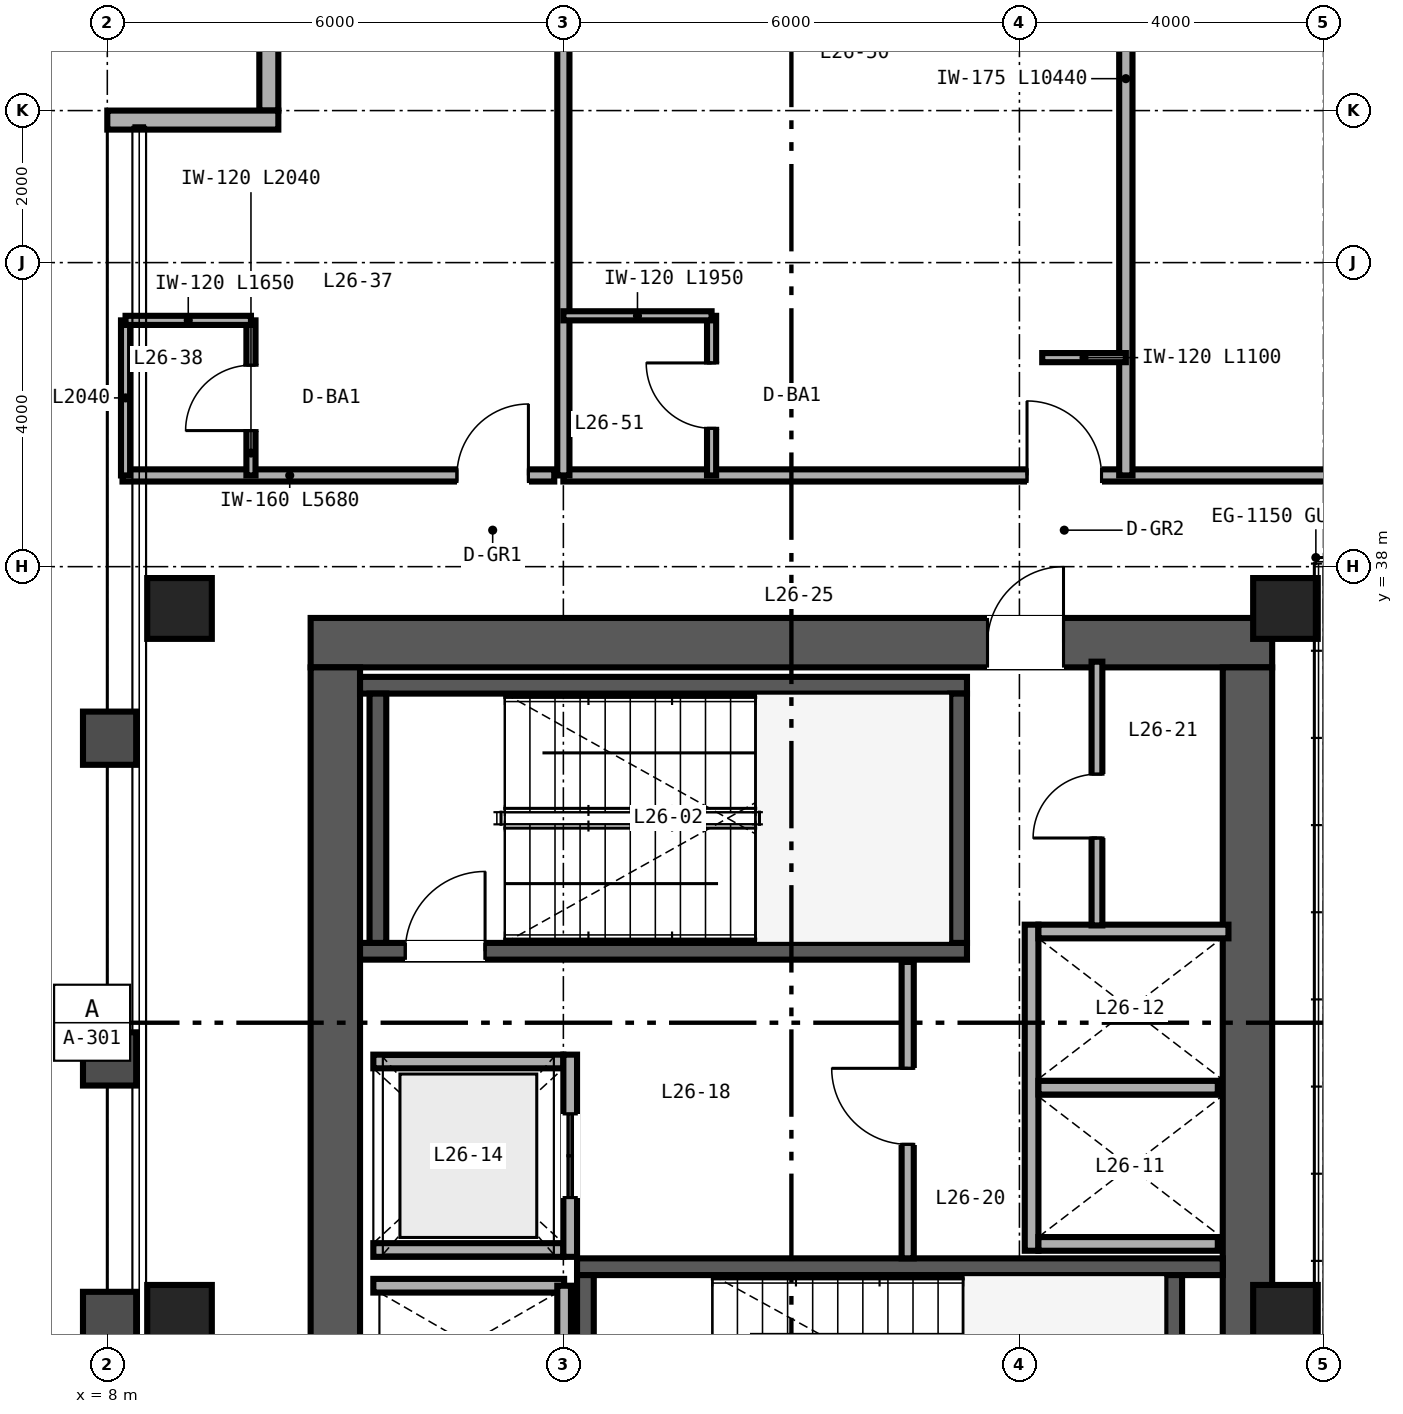
"""IFC4 building model, lengths in metres.
Left out: names, types, materials, properties, quantities, classifications, styles, units other than length and angle.
Written with IfcOpenShell. Run it as: python <this file> out.ifc"""

import sys

from ifc_helpers import new_model, si_unit, direction, frame, frame_2d, origin, origin_2d, place, context, subcontext, project, spatial, rectangle, hollow_rectangle, extrude, source, transform, mapped, element, fill, save


model = new_model("IFC4")
c1 = context("Model", 3, precision=1e-05, world=origin(), true_north=direction((0.0, 1.0)))
c2 = subcontext(c1, "Body", "Model", "MODEL_VIEW")
j1 = project(units=[si_unit("LENGTHUNIT", "METRE"), si_unit("PLANEANGLEUNIT", "RADIAN")], contexts=[c1])
p1 = place(None, origin())
s1 = spatial("IfcSite", under=j1, at=p1, CompositionType="ELEMENT")
p2 = place(p1, origin())
s2 = spatial("IfcBuilding", under=s1, at=p2, CompositionType="ELEMENT")
p3 = place(p2, frame((0.0, 0.0, 108.0)))
s3 = spatial("IfcBuildingStorey", under=s2, at=p3, CompositionType="ELEMENT", Elevation=108.0)
p4 = place(p3, frame((10.675, 37.0, 0.0), z_axis=(0.0, 0.0, 1.0), x_axis=(1.0, 0.0, 0.0)))
e1 = element("IfcWall", 1, at=p4, inside=s3, PredefinedType="SHEAR", context=c2, shape_type="SweptSolid", body=[
    extrude(rectangle(XDim=12.65, YDim=0.65, at=frame_2d((6.325, 0.0))), origin(), (0.0, 0.0, 1.0), 3.36),
])
p5 = place(p4, frame((8.905, 0.0, 0.0)))
e2 = element("IfcOpeningElement", 2, at=p5, cuts=e1, PredefinedType="OPENING", context=c2, shape_type="SweptSolid", body=[
    extrude(rectangle(XDim=1.0, YDim=2.15, at=frame_2d((0.5, 1.075))), frame((0.0, 0.335, 0.0), z_axis=(0.0, -1.0, 0.0), x_axis=(1.0, 0.0, 0.0)), (0.0, 0.0, 1.0), 0.67),
])
for number, where, z_axis, x_axis in (
    (3, (11.0, 15.325, 0.0), (0.0, 0.0, 1.0), (0.0, 1.0, 0.0)),
    (4, (23.0, 15.325, 0.0), (0.0, 0.0, 1.0), (0.0, 1.0, 0.0)),
):
    element("IfcWall", number, at=place(p3, frame(where, z_axis=z_axis, x_axis=x_axis)), inside=s3, PredefinedType="SHEAR", context=c2, shape_type="SweptSolid", body=[
        extrude(rectangle(XDim=21.35, YDim=0.65, at=frame_2d((10.675, 0.0))), origin(), (0.0, 0.0, 1.0), 3.36),
    ])
p6 = place(p3, frame((11.325, 32.94, 0.0), z_axis=(0.0, 0.0, 1.0), x_axis=(1.0, 0.0, 0.0)))
e5 = element("IfcWall", 5, at=p6, inside=s3, PredefinedType="SHEAR", context=c2, shape_type="SweptSolid", body=[
    extrude(rectangle(XDim=7.985, YDim=0.22, at=frame_2d((3.993, 0.0))), origin(), (0.0, 0.0, 1.0), 3.4),
])
p7 = place(p6, frame((0.595, 0.0, 0.0)))
e6 = element("IfcOpeningElement", 6, at=p7, cuts=e5, PredefinedType="OPENING", context=c2, shape_type="SweptSolid", body=[
    extrude(rectangle(XDim=1.05, YDim=2.15, at=frame_2d((0.525, 1.075))), frame((0.0, 0.12, 0.0), z_axis=(0.0, -1.0, 0.0), x_axis=(1.0, 0.0, 0.0)), (0.0, 0.0, 1.0), 0.24),
])
p8 = place(p3, frame((11.325, 36.44, 0.0), z_axis=(0.0, 0.0, 1.0), x_axis=(1.0, 0.0, 0.0)))
e7 = element("IfcWall", 7, at=p8, inside=s3, PredefinedType="SHEAR", context=c2, shape_type="SweptSolid", body=[
    extrude(rectangle(XDim=7.985, YDim=0.22, at=frame_2d((3.993, 0.0))), origin(), (0.0, 0.0, 1.0), 3.4),
])
for number, where, z_axis, x_axis in (
    (8, (11.56, 33.05, 0.0), (0.0, 0.0, 1.0), (0.0, 1.0, 0.0)),
    (9, (19.2, 33.05, 0.0), (0.0, 0.0, 1.0), (0.0, 1.0, 0.0)),
):
    element("IfcWall", number, at=place(p3, frame(where, z_axis=z_axis, x_axis=x_axis)), inside=s3, PredefinedType="SHEAR", context=c2, shape_type="SweptSolid", body=[
        extrude(rectangle(XDim=3.28, YDim=0.22, at=frame_2d((1.64, 0.0))), origin(), (0.0, 0.0, 1.0), 3.4),
    ])
p9 = place(p3, frame((14.18, 28.79, 0.0), z_axis=(0.0, 0.0, 1.0), x_axis=(1.0, 0.0, 0.0)))
e10 = element("IfcWall", 10, at=p9, inside=s3, PredefinedType="SHEAR", context=c2, shape_type="SweptSolid", body=[
    extrude(rectangle(XDim=8.495, YDim=0.22, at=frame_2d((4.248, 0.0))), origin(), (0.0, 0.0, 1.0), 3.4),
])
for number, where, z_axis, x_axis in (
    (11, (14.29, 25.4, 0.0), (0.0, 0.0, 1.0), (0.0, 1.0, 0.0)),
    (12, (22.03, 25.4, 0.0), (0.0, 0.0, 1.0), (0.0, 1.0, 0.0)),
):
    element("IfcWall", number, at=place(p3, frame(where, z_axis=z_axis, x_axis=x_axis)), inside=s3, PredefinedType="SHEAR", context=c2, shape_type="SweptSolid", body=[
        extrude(rectangle(XDim=3.28, YDim=0.22, at=frame_2d((1.64, 0.0))), origin(), (0.0, 0.0, 1.0), 3.4),
    ])
m1 = source(origin(), c2, "Body", "SweptSolid", [
    extrude(hollow_rectangle(XDim=0.85, YDim=0.8, WallThickness=0.032, at=origin_2d()), origin(), (0.0, 0.0, 1.0), 3.36),
])
for number, where, z_axis, x_axis in (
    (13, (8.95, 28.15, 0.0), (0.0, 0.0, 1.0), (1.0, 0.0, 0.0)),
    (14, (23.5, 28.15, 0.0), (0.0, 0.0, 1.0), (1.0, 0.0, 0.0)),
    (15, (8.95, 37.45, 0.0), (0.0, 0.0, 1.0), (1.0, 0.0, 0.0)),
    (16, (23.5, 37.45, 0.0), (0.0, 0.0, 1.0), (1.0, 0.0, 0.0)),
):
    element("IfcColumn", number, at=place(p3, frame(where, z_axis=z_axis, x_axis=x_axis)), inside=s3, PredefinedType="COLUMN", context=c2, shape_type="MappedRepresentation", body=[
        mapped(m1, transform((0.0, 0.0, 0.0), scale=1.0)),
    ])
p10 = place(p3, frame((10.125, 46.0, 0.0), z_axis=(0.0, 0.0, 1.0), x_axis=(0.0, -1.0, 0.0)))
e17 = element("IfcWall", 17, at=p10, inside=s3, PredefinedType="SOLIDWALL", context=c2, shape_type="SweptSolid", body=[
    extrude(rectangle(XDim=2.0, YDim=0.25, at=frame_2d((1.0, 0.0))), origin(), (0.0, 0.0, 1.0), 3.36),
])
p11 = place(p3, frame((10.25, 43.875, 0.0), z_axis=(0.0, 0.0, 1.0), x_axis=(-1.0, 0.0, 0.0)))
e18 = element("IfcWall", 18, at=p11, inside=s3, PredefinedType="SOLIDWALL", context=c2, shape_type="SweptSolid", body=[
    extrude(rectangle(XDim=2.25, YDim=0.25, at=frame_2d((1.125, 0.0))), origin(), (0.0, 0.0, 1.0), 3.36),
])
p12 = place(p3, frame((20.16, 29.0, 0.0), z_axis=(0.0, 0.0, 1.0), x_axis=(0.0, 1.0, 0.0)))
e19 = element("IfcWall", 19, at=p12, inside=s3, PredefinedType="SOLIDWALL", context=c2, shape_type="SweptSolid", body=[
    extrude(rectangle(XDim=4.29, YDim=0.18, at=frame_2d((2.145, 0.0))), origin(), (0.0, 0.0, 1.0), 3.36),
])
p13 = place(p3, frame((20.25, 29.09, 0.0), z_axis=(0.0, 0.0, 1.0), x_axis=(1.0, 0.0, 0.0)))
e20 = element("IfcWall", 20, at=p13, inside=s3, PredefinedType="SOLIDWALL", context=c2, shape_type="SweptSolid", body=[
    extrude(rectangle(XDim=2.36, YDim=0.18, at=frame_2d((1.18, 0.0))), origin(), (0.0, 0.0, 1.0), 3.36),
])
p14 = place(p3, frame((20.25, 33.2, 0.0), z_axis=(0.0, 0.0, 1.0), x_axis=(1.0, 0.0, 0.0)))
e21 = element("IfcWall", 21, at=p14, inside=s3, PredefinedType="SOLIDWALL", context=c2, shape_type="SweptSolid", body=[
    extrude(rectangle(XDim=2.5, YDim=0.18, at=frame_2d((1.25, 0.0))), origin(), (0.0, 0.0, 1.0), 3.36),
])
p15 = place(p3, frame((20.25, 31.145, 0.0), z_axis=(0.0, 0.0, 1.0), x_axis=(1.0, 0.0, 0.0)))
e22 = element("IfcWall", 22, at=p15, inside=s3, PredefinedType="SOLIDWALL", context=c2, shape_type="SweptSolid", body=[
    extrude(rectangle(XDim=2.36, YDim=0.18, at=frame_2d((1.18, 0.0))), origin(), (0.0, 0.0, 1.0), 3.36),
])
for number, where, z_axis, x_axis in (
    (23, (11.5, 29.01, 0.0), (0.0, 0.0, 1.0), (1.0, 0.0, 0.0)),
    (24, (11.5, 31.49, 0.0), (0.0, 0.0, 1.0), (1.0, 0.0, 0.0)),
):
    element("IfcWall", number, at=place(p3, frame(where, z_axis=z_axis, x_axis=x_axis)), inside=s3, PredefinedType="SOLIDWALL", context=c2, shape_type="SweptSolid", body=[
        extrude(rectangle(XDim=2.5, YDim=0.18, at=frame_2d((1.25, 0.0))), origin(), (0.0, 0.0, 1.0), 3.36),
    ])
p16 = place(p3, frame((14.09, 28.92, 0.0), z_axis=(0.0, 0.0, 1.0), x_axis=(0.0, 1.0, 0.0)))
e25 = element("IfcWall", 25, at=p16, inside=s3, PredefinedType="SOLIDWALL", context=c2, shape_type="SweptSolid", body=[
    extrude(rectangle(XDim=2.66, YDim=0.18, at=frame_2d((1.33, 0.0))), origin(), (0.0, 0.0, 1.0), 3.36),
])
p17 = place(p16, frame((0.78, 0.0, 0.0)))
e26 = element("IfcOpeningElement", 26, at=p17, cuts=e25, PredefinedType="OPENING", context=c2, shape_type="SweptSolid", body=[
    extrude(rectangle(XDim=1.1, YDim=2.2, at=frame_2d((0.55, 1.1))), frame((0.0, 0.1, 0.0), z_axis=(0.0, -1.0, 0.0), x_axis=(1.0, 0.0, 0.0)), (0.0, 0.0, 1.0), 0.2),
])
p18 = place(p3, frame((11.5, 28.54, 0.0), z_axis=(0.0, 0.0, 1.0), x_axis=(1.0, 0.0, 0.0)))
e27 = element("IfcWall", 27, at=p18, inside=s3, PredefinedType="SOLIDWALL", context=c2, shape_type="SweptSolid", body=[
    extrude(rectangle(XDim=2.51, YDim=0.18, at=frame_2d((1.255, 0.0))), origin(), (0.0, 0.0, 1.0), 3.36),
])
p19 = place(p3, frame((14.01, 25.46, 0.0), z_axis=(0.0, 0.0, 1.0), x_axis=(0.0, 1.0, 0.0)))
e28 = element("IfcWall", 28, at=p19, inside=s3, PredefinedType="SOLIDWALL", context=c2, shape_type="SweptSolid", body=[
    extrude(rectangle(XDim=3.08, YDim=0.18, at=frame_2d((1.54, 0.0))), origin(), (0.0, 0.0, 1.0), 3.36),
])
p20 = place(p3, frame((18.53, 28.9, 0.0), z_axis=(0.0, 0.0, 1.0), x_axis=(0.0, 1.0, 0.0)))
e29 = element("IfcWall", 29, at=p20, inside=s3, PredefinedType="PARTITIONING", context=c2, shape_type="SweptSolid", body=[
    extrude(rectangle(XDim=3.9, YDim=0.16, at=frame_2d((1.95, 0.0))), origin(), (0.0, 0.0, 1.0), 3.36),
])
p21 = place(p20, frame((1.5, 0.0, 0.0)))
e30 = element("IfcOpeningElement", 30, at=p21, cuts=e29, PredefinedType="OPENING", context=c2, shape_type="SweptSolid", body=[
    extrude(rectangle(XDim=1.0, YDim=2.15, at=frame_2d((0.5, 1.075))), frame((0.0, 0.09, 0.0), z_axis=(0.0, -1.0, 0.0), x_axis=(1.0, 0.0, 0.0)), (0.0, 0.0, 1.0), 0.18),
])
p22 = place(p3, frame((21.02, 33.28, 0.0), z_axis=(0.0, 0.0, 1.0), x_axis=(0.0, 1.0, 0.0)))
e31 = element("IfcWall", 31, at=p22, inside=s3, PredefinedType="PARTITIONING", context=c2, shape_type="SweptSolid", body=[
    extrude(rectangle(XDim=3.47, YDim=0.142, at=frame_2d((1.735, 0.0))), origin(), (0.0, 0.0, 1.0), 3.36),
])
p23 = place(p22, frame((1.15, 0.0, 0.0)))
e32 = element("IfcOpeningElement", 32, at=p23, cuts=e31, PredefinedType="OPENING", context=c2, shape_type="SweptSolid", body=[
    extrude(rectangle(XDim=0.84, YDim=2.1, at=frame_2d((0.42, 1.05))), frame((0.0, 0.081, 0.0), z_axis=(0.0, -1.0, 0.0), x_axis=(1.0, 0.0, 0.0)), (0.0, 0.0, 1.0), 0.162),
])
p24 = place(p3, frame((8.2, 39.2, 0.0), z_axis=(0.0, 0.0, 1.0), x_axis=(1.0, 0.0, 0.0)))
e33 = element("IfcWall", 33, at=p24, inside=s3, PredefinedType="PARTITIONING", context=c2, shape_type="SweptSolid", body=[
    extrude(rectangle(XDim=5.68, YDim=0.16, at=frame_2d((2.84, 0.0))), origin(), (0.0, 0.0, 1.0), 3.36),
])
p25 = place(p24, frame((4.4, 0.0, 0.0)))
e34 = element("IfcOpeningElement", 34, at=p25, cuts=e33, PredefinedType="OPENING", context=c2, shape_type="SweptSolid", body=[
    extrude(rectangle(XDim=0.94, YDim=2.15, at=frame_2d((0.47, 1.075))), frame((0.0, 0.09, 0.0), z_axis=(0.0, -1.0, 0.0), x_axis=(1.0, 0.0, 0.0)), (0.0, 0.0, 1.0), 0.18),
])
p26 = place(p3, frame((9.89, 39.2, 0.0), z_axis=(0.0, 0.0, 1.0), x_axis=(0.0, 1.0, 0.0)))
e35 = element("IfcWall", 35, at=p26, inside=s3, PredefinedType="PARTITIONING", context=c2, shape_type="SweptSolid", body=[
    extrude(rectangle(XDim=2.04, YDim=0.12, at=frame_2d((1.02, 0.0))), origin(), (0.0, 0.0, 1.0), 3.36),
])
p27 = place(p26, frame((0.59, 0.0, 0.0)))
e36 = element("IfcOpeningElement", 36, at=p27, cuts=e35, PredefinedType="OPENING", context=c2, shape_type="SweptSolid", body=[
    extrude(rectangle(XDim=0.86, YDim=2.1, at=frame_2d((0.43, 1.05))), frame((0.0, 0.07, 0.0), z_axis=(0.0, -1.0, 0.0), x_axis=(1.0, 0.0, 0.0)), (0.0, 0.0, 1.0), 0.14),
])
p28 = place(p3, frame((8.24, 39.2, 0.0), z_axis=(0.0, 0.0, 1.0), x_axis=(0.0, 1.0, 0.0)))
e37 = element("IfcWall", 37, at=p28, inside=s3, PredefinedType="PARTITIONING", context=c2, shape_type="SweptSolid", body=[
    extrude(rectangle(XDim=2.04, YDim=0.12, at=frame_2d((1.02, 0.0))), origin(), (0.0, 0.0, 1.0), 3.36),
])
p29 = place(p3, frame((8.24, 41.24, 0.0), z_axis=(0.0, 0.0, 1.0), x_axis=(1.0, 0.0, 0.0)))
e38 = element("IfcWall", 38, at=p29, inside=s3, PredefinedType="PARTITIONING", context=c2, shape_type="SweptSolid", body=[
    extrude(rectangle(XDim=1.65, YDim=0.12, at=frame_2d((0.825, 0.0))), origin(), (0.0, 0.0, 1.0), 3.36),
])
p30 = place(p3, frame((14.0, 39.2, 0.0), z_axis=(0.0, 0.0, 1.0), x_axis=(1.0, 0.0, 0.0)))
e39 = element("IfcWall", 39, at=p30, inside=s3, PredefinedType="PARTITIONING", context=c2, shape_type="SweptSolid", body=[
    extrude(rectangle(XDim=36.0, YDim=0.16, at=frame_2d((18.0, 0.0))), origin(), (0.0, 0.0, 1.0), 2.581),
])
p31 = place(p30, frame((6.1, 0.0, 0.0)))
e40 = element("IfcOpeningElement", 40, at=p31, cuts=e39, PredefinedType="OPENING", context=c2, shape_type="SweptSolid", body=[
    extrude(rectangle(XDim=0.98, YDim=2.2, at=frame_2d((0.49, 1.1))), frame((0.0, 0.09, 0.0), z_axis=(0.0, -1.0, 0.0), x_axis=(1.0, 0.0, 0.0)), (0.0, 0.0, 1.0), 0.18),
])
p32 = place(p30, frame((10.62, 0.0, 0.0)))
e41 = element("IfcOpeningElement", 41, at=p32, cuts=e39, PredefinedType="OPENING", context=c2, shape_type="SweptSolid", body=[
    extrude(rectangle(XDim=0.96, YDim=2.15, at=frame_2d((0.48, 1.075))), frame((0.0, 0.09, 0.0), z_axis=(0.0, -1.0, 0.0), x_axis=(1.0, 0.0, 0.0)), (0.0, 0.0, 1.0), 0.18),
])
p33 = place(p30, frame((21.1, 0.0, 0.0)))
e42 = element("IfcOpeningElement", 42, at=p33, cuts=e39, PredefinedType="OPENING", context=c2, shape_type="SweptSolid", body=[
    extrude(rectangle(XDim=0.98, YDim=2.2, at=frame_2d((0.49, 1.1))), frame((0.0, 0.09, 0.0), z_axis=(0.0, -1.0, 0.0), x_axis=(1.0, 0.0, 0.0)), (0.0, 0.0, 1.0), 0.18),
])
p34 = place(p30, frame((24.84, 0.0, 0.0)))
e43 = element("IfcOpeningElement", 43, at=p34, cuts=e39, PredefinedType="OPENING", context=c2, shape_type="SweptSolid", body=[
    extrude(rectangle(XDim=0.96, YDim=2.15, at=frame_2d((0.48, 1.075))), frame((0.0, 0.09, 0.0), z_axis=(0.0, -1.0, 0.0), x_axis=(1.0, 0.0, 0.0)), (0.0, 0.0, 1.0), 0.18),
])
p35 = place(p30, frame((34.74, 0.0, 0.0)))
e44 = element("IfcOpeningElement", 44, at=p35, cuts=e39, PredefinedType="OPENING", context=c2, shape_type="SweptSolid", body=[
    extrude(rectangle(XDim=0.94, YDim=2.15, at=frame_2d((0.47, 1.075))), frame((0.0, 0.09, 0.0), z_axis=(0.0, -1.0, 0.0), x_axis=(1.0, 0.0, 0.0)), (0.0, 0.0, 1.0), 0.18),
])
p36 = place(p3, frame((14.0, 39.2, 0.0), z_axis=(0.0, 0.0, 1.0), x_axis=(0.0, 1.0, 0.0)))
e45 = element("IfcWall", 45, at=p36, inside=s3, PredefinedType="PARTITIONING", context=c2, shape_type="SweptSolid", body=[
    extrude(rectangle(XDim=10.44, YDim=0.16, at=frame_2d((5.22, 0.0))), origin(), (0.0, 0.0, 1.0), 2.667),
])
p37 = place(p3, frame((21.4, 39.2, 0.0), z_axis=(0.0, 0.0, 1.0), x_axis=(0.0, 1.0, 0.0)))
e46 = element("IfcWall", 46, at=p37, inside=s3, PredefinedType="PARTITIONING", context=c2, shape_type="SweptSolid", body=[
    extrude(rectangle(XDim=10.44, YDim=0.175, at=frame_2d((5.22, 0.0))), origin(), (0.0, 0.0, 1.0), 2.823),
])
p38 = place(p3, frame((15.95, 39.2, 0.0), z_axis=(0.0, 0.0, 1.0), x_axis=(0.0, 1.0, 0.0)))
e47 = element("IfcWall", 47, at=p38, inside=s3, PredefinedType="PARTITIONING", context=c2, shape_type="SweptSolid", body=[
    extrude(rectangle(XDim=2.1, YDim=0.12, at=frame_2d((1.05, 0.0))), origin(), (0.0, 0.0, 1.0), 3.36),
])
p39 = place(p38, frame((0.62, 0.0, 0.0)))
e48 = element("IfcOpeningElement", 48, at=p39, cuts=e47, PredefinedType="OPENING", context=c2, shape_type="SweptSolid", body=[
    extrude(rectangle(XDim=0.86, YDim=2.1, at=frame_2d((0.43, 1.05))), frame((0.0, 0.07, 0.0), z_axis=(0.0, -1.0, 0.0), x_axis=(1.0, 0.0, 0.0)), (0.0, 0.0, 1.0), 0.14),
])
p40 = place(p3, frame((14.0, 41.3, 0.0), z_axis=(0.0, 0.0, 1.0), x_axis=(1.0, 0.0, 0.0)))
e49 = element("IfcWall", 49, at=p40, inside=s3, PredefinedType="PARTITIONING", context=c2, shape_type="SweptSolid", body=[
    extrude(rectangle(XDim=1.95, YDim=0.12, at=frame_2d((0.975, 0.0))), origin(), (0.0, 0.0, 1.0), 3.36),
])
p41 = place(p3, frame((20.3, 40.75, 0.0), z_axis=(0.0, 0.0, 1.0), x_axis=(1.0, 0.0, 0.0)))
e50 = element("IfcWall", 50, at=p41, inside=s3, PredefinedType="PARTITIONING", context=c2, shape_type="SweptSolid", body=[
    extrude(rectangle(XDim=1.1, YDim=0.12, at=frame_2d((0.55, 0.0))), origin(), (0.0, 0.0, 1.0), 3.36),
])
m2 = source(origin(), c2, "Body", "SweptSolid", [
    extrude(rectangle(XDim=1.05, YDim=2.15, at=frame_2d((0.525, 1.075))), frame((0.0, 0.025, 0.0), z_axis=(0.0, -1.0, 0.0), x_axis=(1.0, 0.0, 0.0)), (0.0, 0.0, 1.0), 0.05),
])
p42 = place(p7, origin())
e51 = element("IfcDoor", 51, at=p42, inside=s3, OperationType="SINGLE_SWING_RIGHT", PredefinedType="DOOR", context=c2, shape_type="MappedRepresentation", body=[
    mapped(m2, transform((0.0, 0.0, 0.0), scale=1.0)),
])
fill(e6, e51)
m3 = source(origin(), c2, "Body", "SweptSolid", [
    extrude(rectangle(XDim=1.1, YDim=2.2, at=frame_2d((0.55, 1.1))), frame((0.0, 0.025, 0.0), z_axis=(0.0, -1.0, 0.0), x_axis=(1.0, 0.0, 0.0)), (0.0, 0.0, 1.0), 0.05),
])
p43 = place(p17, origin())
e52 = element("IfcDoor", 52, at=p43, inside=s3, OperationType="DOUBLE_DOOR_SLIDING", PredefinedType="DOOR", context=c2, shape_type="MappedRepresentation", body=[
    mapped(m3, transform((0.0, 0.0, 0.0), scale=1.0)),
])
fill(e26, e52)
m4 = source(origin(), c2, "Body", "SweptSolid", [
    extrude(rectangle(XDim=1.0, YDim=2.15, at=frame_2d((0.5, 1.075))), frame((0.0, 0.025, 0.0), z_axis=(0.0, -1.0, 0.0), x_axis=(1.0, 0.0, 0.0)), (0.0, 0.0, 1.0), 0.05),
])
p44 = place(p21, origin())
e53 = element("IfcDoor", 53, at=p44, inside=s3, OperationType="SINGLE_SWING_RIGHT", PredefinedType="DOOR", context=c2, shape_type="MappedRepresentation", body=[
    mapped(m4, transform((0.0, 0.0, 0.0), scale=1.0)),
])
fill(e30, e53)
m5 = source(origin(), c2, "Body", "SweptSolid", [
    extrude(rectangle(XDim=0.84, YDim=2.1, at=frame_2d((0.42, 1.05))), frame((0.0, 0.025, 0.0), z_axis=(0.0, -1.0, 0.0), x_axis=(1.0, 0.0, 0.0)), (0.0, 0.0, 1.0), 0.05),
])
p45 = place(p23, origin())
e54 = element("IfcDoor", 54, at=p45, inside=s3, OperationType="SINGLE_SWING_LEFT", PredefinedType="DOOR", context=c2, shape_type="MappedRepresentation", body=[
    mapped(m5, transform((0.0, 0.0, 0.0), scale=1.0)),
])
fill(e32, e54)
p46 = place(p5, origin())
e55 = element("IfcDoor", 55, at=p46, inside=s3, OperationType="SINGLE_SWING_RIGHT", PredefinedType="DOOR", context=c2, shape_type="MappedRepresentation", body=[
    mapped(m4, transform((0.0, 0.0, 0.0), scale=1.0)),
])
fill(e2, e55)
m6 = source(origin(), c2, "Body", "SweptSolid", [
    extrude(rectangle(XDim=0.86, YDim=2.1, at=frame_2d((0.43, 1.05))), frame((0.0, 0.025, 0.0), z_axis=(0.0, -1.0, 0.0), x_axis=(1.0, 0.0, 0.0)), (0.0, 0.0, 1.0), 0.05),
])
p47 = place(p27, origin())
e56 = element("IfcDoor", 56, at=p47, inside=s3, OperationType="SINGLE_SWING_LEFT", PredefinedType="DOOR", context=c2, shape_type="MappedRepresentation", body=[
    mapped(m6, transform((0.0, 0.0, 0.0), scale=1.0)),
])
fill(e36, e56)
m7 = source(origin(), c2, "Body", "SweptSolid", [
    extrude(rectangle(XDim=0.94, YDim=2.15, at=frame_2d((0.47, 1.075))), frame((0.0, 0.025, 0.0), z_axis=(0.0, -1.0, 0.0), x_axis=(1.0, 0.0, 0.0)), (0.0, 0.0, 1.0), 0.05),
])
p48 = place(p25, origin())
e57 = element("IfcDoor", 57, at=p48, inside=s3, OperationType="SINGLE_SWING_RIGHT", PredefinedType="DOOR", context=c2, shape_type="MappedRepresentation", body=[
    mapped(m7, transform((0.0, 0.0, 0.0), scale=1.0)),
])
fill(e34, e57)
p49 = place(p39, origin())
e58 = element("IfcDoor", 58, at=p49, inside=s3, OperationType="SINGLE_SWING_RIGHT", PredefinedType="DOOR", context=c2, shape_type="MappedRepresentation", body=[
    mapped(m6, transform((0.0, 0.0, 0.0), scale=1.0)),
])
fill(e48, e58)
m8 = source(origin(), c2, "Body", "SweptSolid", [
    extrude(rectangle(XDim=0.98, YDim=2.2, at=frame_2d((0.49, 1.1))), frame((0.0, 0.025, 0.0), z_axis=(0.0, -1.0, 0.0), x_axis=(1.0, 0.0, 0.0)), (0.0, 0.0, 1.0), 0.05),
])
p50 = place(p31, origin())
e59 = element("IfcDoor", 59, at=p50, inside=s3, OperationType="SINGLE_SWING_LEFT", PredefinedType="DOOR", context=c2, shape_type="MappedRepresentation", body=[
    mapped(m8, transform((0.0, 0.0, 0.0), scale=1.0)),
])
fill(e40, e59)
save(model, sys.argv[1])
